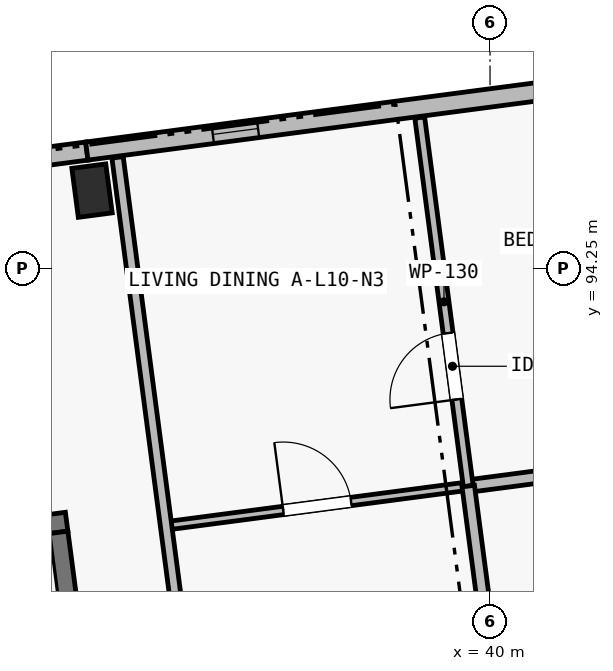
"""IFC4 building model, lengths in metres.
Left out: names, types, materials, properties, quantities, classifications, styles, units other than length and angle.
Written with IfcOpenShell. Run it as: python <this file> out.ifc"""

import sys

from ifc_helpers import new_model, si_unit, direction, frame, frame_2d, origin, origin_2d, place, context, subcontext, project, spatial, rectangle, extrude, element, fill, save


model = new_model("IFC4")
c1 = context("Model", 3, precision=1e-05, world=origin(), true_north=direction((0.0, 1.0)))
c2 = subcontext(c1, "Body", "Model", "MODEL_VIEW")
j1 = project(units=[si_unit("LENGTHUNIT", "METRE"), si_unit("PLANEANGLEUNIT", "RADIAN")], contexts=[c1])
p1 = place(None, origin())
s1 = spatial("IfcSite", under=j1, at=p1, CompositionType="ELEMENT")
p2 = place(p1, origin())
s2 = spatial("IfcBuilding", under=s1, at=p2, CompositionType="ELEMENT")
p3 = place(p2, frame((0.0, 0.0, 34.4)))
s3 = spatial("IfcBuildingStorey", under=s2, at=p3, CompositionType="ELEMENT", Elevation=34.4)
p4 = place(p3, frame((34.764, 95.275, 0.0), z_axis=(0.0, 0.0, 1.0), x_axis=(0.991444861374, 0.13052619222, 0.0)))
e1 = element("IfcColumn", 1, at=p4, inside=s3, PredefinedType="COLUMN", context=c2, shape_type="SweptSolid", body=[
    extrude(rectangle(XDim=0.45, YDim=0.65, at=origin_2d()), origin(), (0.0, 0.0, 1.0), 3.25),
])
p5 = place(p3, frame((27.489, 90.005, 0.0), z_axis=(0.0, 0.0, 1.0), x_axis=(0.991441944909, 0.130548343059, 0.0)))
e2 = element("IfcWall", 2, at=p5, inside=s3, PredefinedType="SHEAR", context=c2, shape_type="SweptSolid", body=[
    extrude(rectangle(XDim=7.0, YDim=0.25, at=frame_2d((3.5, 0.0))), origin(), (0.0, 0.0, 1.0), 3.25),
])
p6 = place(p5, frame((0.45, 0.0, 0.0)))
e3 = element("IfcOpeningElement", 3, at=p6, cuts=e2, PredefinedType="OPENING", context=c2, shape_type="SweptSolid", body=[
    extrude(rectangle(XDim=0.9, YDim=2.1, at=frame_2d((0.45, 1.05))), frame((0.0, 0.14, 0.0), z_axis=(0.0, -1.0, 0.0), x_axis=(1.0, 0.0, 0.0)), (0.0, 0.0, 1.0), 0.28),
])
p7 = place(p3, frame((34.694, 87.953, 0.0), z_axis=(0.0, 0.0, 1.0), x_axis=(-0.130474457355, 0.991451671025, 0.0)))
e4 = element("IfcWall", 4, at=p7, inside=s3, PredefinedType="SHEAR", context=c2, shape_type="SweptSolid", body=[
    extrude(rectangle(XDim=2.85, YDim=0.25, at=frame_2d((1.425, 0.0))), origin(), (0.0, 0.0, 1.0), 3.25),
])
p8 = place(p3, frame((31.746, 95.407, 0.0), z_axis=(0.0, 0.0, 1.0), x_axis=(0.991439484875, 0.130567024289, 0.0)))
e5 = element("IfcWall", 5, at=p8, inside=s3, PredefinedType="SOLIDWALL", context=c2, shape_type="SweptSolid", body=[
    extrude(rectangle(XDim=2.975, YDim=0.24, at=frame_2d((1.487, 0.0))), origin(), (0.0, 0.0, 1.0), 3.0),
])
p9 = place(p3, frame((34.695, 95.795, 0.0), z_axis=(0.0, 0.0, 1.0), x_axis=(0.991447967712, 0.130502595073, 0.0)))
e6 = element("IfcWall", 6, at=p9, inside=s3, PredefinedType="SOLIDWALL", context=c2, shape_type="SweptSolid", body=[
    extrude(rectangle(XDim=8.8, YDim=0.24, at=frame_2d((4.4, 0.0))), origin(), (0.0, 0.0, 1.0), 3.0),
])
p10 = place(p9, frame((1.672, 0.0, 0.5)))
e7 = element("IfcOpeningElement", 7, at=p10, cuts=e6, PredefinedType="OPENING", context=c2, shape_type="SweptSolid", body=[
    extrude(rectangle(XDim=0.6, YDim=2.22, at=frame_2d((0.3, 1.11))), frame((0.0, 0.135, 0.0), z_axis=(0.0, -1.0, 0.0), x_axis=(1.0, 0.0, 0.0)), (0.0, 0.0, 1.0), 0.27),
])
p11 = place(p9, frame((7.066, 0.0, 0.44)))
e8 = element("IfcOpeningElement", 8, at=p11, cuts=e6, PredefinedType="OPENING", context=c2, shape_type="SweptSolid", body=[
    extrude(rectangle(XDim=0.68, YDim=2.24, at=frame_2d((0.34, 1.12))), frame((0.0, 0.135, 0.0), z_axis=(0.0, -1.0, 0.0), x_axis=(1.0, 0.0, 0.0)), (0.0, 0.0, 1.0), 0.27),
])
p12 = place(p3, frame((35.738, 90.864, 0.0), z_axis=(0.0, 0.0, 1.0), x_axis=(0.991444553502, 0.130528530716, 0.0)))
e9 = element("IfcWall", 9, at=p12, inside=s3, PredefinedType="PARTITIONING", context=c2, shape_type="SweptSolid", body=[
    extrude(rectangle(XDim=4.01, YDim=0.11, at=frame_2d((2.005, 0.0))), origin(), (0.0, 0.0, 1.0), 2.97),
])
p13 = place(p12, frame((1.555, 0.0, 0.0)))
e10 = element("IfcOpeningElement", 10, at=p13, cuts=e9, PredefinedType="OPENING", context=c2, shape_type="SweptSolid", body=[
    extrude(rectangle(XDim=0.9, YDim=2.1, at=frame_2d((0.45, 1.05))), frame((0.0, 0.07, 0.0), z_axis=(0.0, -1.0, 0.0), x_axis=(1.0, 0.0, 0.0)), (0.0, 0.0, 1.0), 0.14),
])
p14 = place(p3, frame((39.713, 91.388, 0.0), z_axis=(0.0, 0.0, 1.0), x_axis=(0.991443516139, 0.130536409887, 0.0)))
e11 = element("IfcWall", 11, at=p14, inside=s3, PredefinedType="PLUMBINGWALL", context=c2, shape_type="SweptSolid", body=[
    extrude(rectangle(XDim=4.01, YDim=0.165, at=frame_2d((2.005, 0.0))), origin(), (0.0, 0.0, 1.0), 2.97),
])
p15 = place(p14, frame((1.595, 0.0, 0.0)))
e12 = element("IfcOpeningElement", 12, at=p15, cuts=e11, PredefinedType="OPENING", context=c2, shape_type="SweptSolid", body=[
    extrude(rectangle(XDim=0.82, YDim=2.08, at=frame_2d((0.41, 1.04))), frame((0.0, 0.097, 0.0), z_axis=(0.0, -1.0, 0.0), x_axis=(1.0, 0.0, 0.0)), (0.0, 0.0, 1.0), 0.195),
])
p16 = place(p3, frame((39.713, 91.388, 0.0), z_axis=(0.0, 0.0, 1.0), x_axis=(-0.130557831536, 0.991440695465, 0.0)))
e13 = element("IfcWall", 13, at=p16, inside=s3, PredefinedType="PARTITIONING", context=c2, shape_type="SweptSolid", body=[
    extrude(rectangle(XDim=4.89, YDim=0.13, at=frame_2d((2.445, 0.0))), origin(), (0.0, 0.0, 1.0), 2.97),
])
p17 = place(p16, frame((1.15, 0.0, 0.0)))
e14 = element("IfcOpeningElement", 14, at=p17, cuts=e13, PredefinedType="OPENING", context=c2, shape_type="SweptSolid", body=[
    extrude(rectangle(XDim=0.88, YDim=2.1, at=frame_2d((0.44, 1.05))), frame((0.0, 0.08, 0.0), z_axis=(0.0, -1.0, 0.0), x_axis=(1.0, 0.0, 0.0)), (0.0, 0.0, 1.0), 0.16),
])
p18 = place(p3, frame((40.389, 86.252, 0.0), z_axis=(0.0, 0.0, 1.0), x_axis=(-0.130505718023, 0.991447556638, 0.0)))
e15 = element("IfcWall", 15, at=p18, inside=s3, PredefinedType="PLUMBINGWALL", context=c2, shape_type="SweptSolid", body=[
    extrude(rectangle(XDim=5.18, YDim=0.165, at=frame_2d((2.59, 0.0))), origin(), (0.0, 0.0, 1.0), 2.97),
])
p19 = place(p3, frame((36.414, 85.729, 0.0), z_axis=(0.0, 0.0, 1.0), x_axis=(-0.130531024319, 0.991444225204, 0.0)))
e16 = element("IfcWall", 16, at=p19, inside=s3, PredefinedType="PARTITIONING", context=c2, shape_type="SweptSolid", body=[
    extrude(rectangle(XDim=10.07, YDim=0.15, at=frame_2d((5.035, 0.0))), origin(), (0.0, 0.0, 1.0), 2.97),
])
p20 = place(p10, origin())
e17 = element("IfcWindow", 17, at=p20, inside=s3, PartitioningType="SINGLE_PANEL", PredefinedType="WINDOW", context=c2, shape_type="SweptSolid", body=[
    extrude(rectangle(XDim=0.6, YDim=2.22, at=frame_2d((0.3, 1.11))), frame((0.0, 0.03, 0.0), z_axis=(0.0, -1.0, 0.0), x_axis=(1.0, 0.0, 0.0)), (0.0, 0.0, 1.0), 0.06),
])
fill(e7, e17)
p21 = place(p13, origin())
e18 = element("IfcDoor", 18, at=p21, inside=s3, OperationType="SINGLE_SWING_LEFT", PredefinedType="DOOR", context=c2, shape_type="SweptSolid", body=[
    extrude(rectangle(XDim=0.9, YDim=2.1, at=frame_2d((0.45, 1.05))), frame((0.0, 0.025, 0.0), z_axis=(0.0, -1.0, 0.0), x_axis=(1.0, 0.0, 0.0)), (0.0, 0.0, 1.0), 0.05),
])
fill(e10, e18)
p22 = place(p17, origin())
e19 = element("IfcDoor", 19, at=p22, inside=s3, OperationType="SINGLE_SWING_LEFT", PredefinedType="DOOR", context=c2, shape_type="SweptSolid", body=[
    extrude(rectangle(XDim=0.88, YDim=2.1, at=frame_2d((0.44, 1.05))), frame((0.0, 0.025, 0.0), z_axis=(0.0, -1.0, 0.0), x_axis=(1.0, 0.0, 0.0)), (0.0, 0.0, 1.0), 0.05),
])
fill(e14, e19)
save(model, sys.argv[1])
